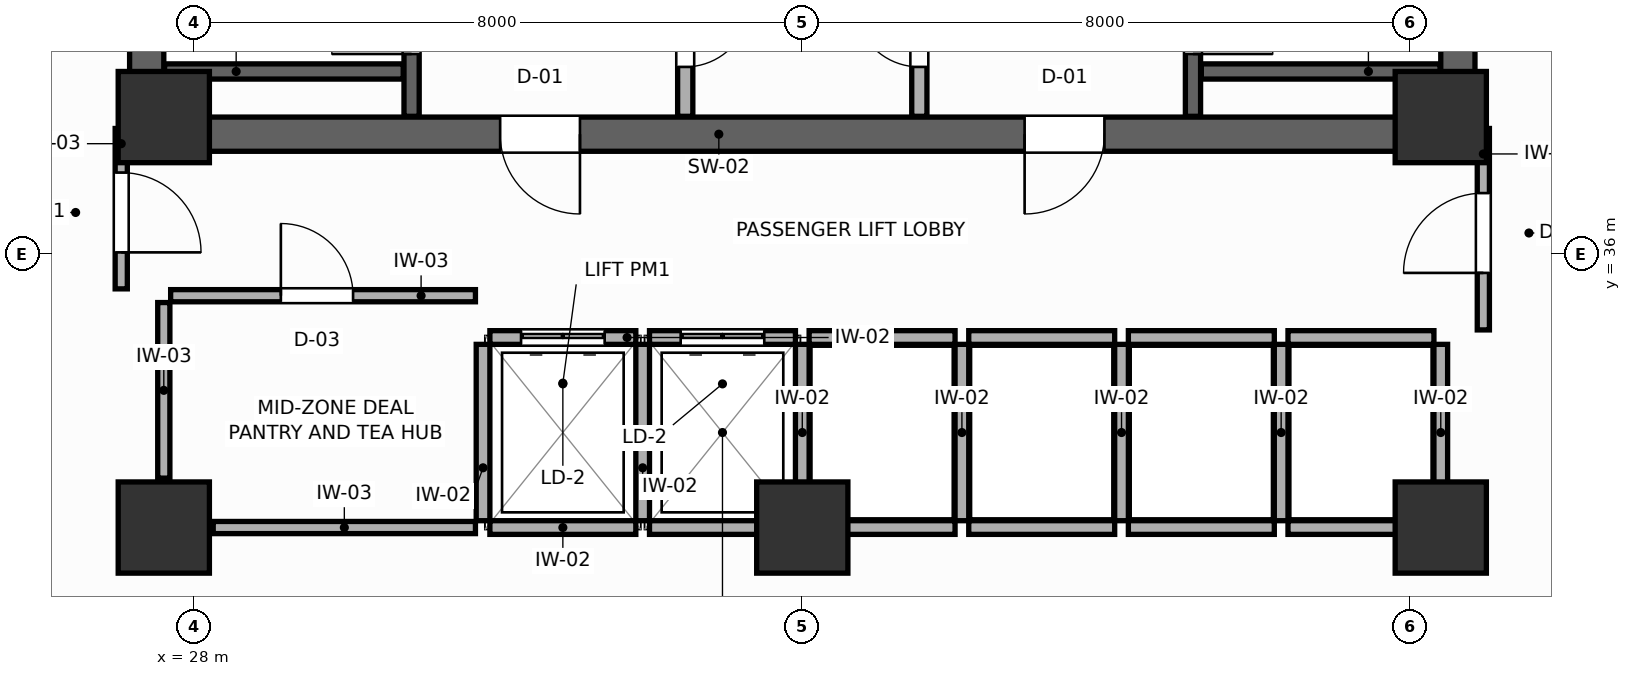
"""IFC4 building model, lengths in metres.
Left out: names, types, materials, properties, quantities, classifications, styles, units other than length and angle.
Written with IfcOpenShell. Run it as: python <this file> out.ifc"""

import sys

from ifc_helpers import new_model, si_unit, direction, frame, frame_2d, origin, origin_2d, place, context, subcontext, project, spatial, rectangle, extrude, source, transform, mapped, element, fill, save


model = new_model("IFC4")
c1 = context("Model", 3, precision=1e-05, world=origin(), true_north=direction((0.0, 1.0)))
c2 = subcontext(c1, "Body", "Model", "MODEL_VIEW")
j1 = project(units=[si_unit("LENGTHUNIT", "METRE"), si_unit("PLANEANGLEUNIT", "RADIAN")], contexts=[c1])
p1 = place(None, origin())
s1 = spatial("IfcSite", under=j1, at=p1, CompositionType="ELEMENT")
p2 = place(p1, origin())
s2 = spatial("IfcBuilding", under=s1, at=p2, CompositionType="ELEMENT")
p3 = place(p2, frame((0.0, 0.0, 154.2)))
s3 = spatial("IfcBuildingStorey", under=s2, at=p3, CompositionType="ELEMENT", Elevation=154.2)
p4 = place(p3, frame((27.15, 37.575, 0.0), z_axis=(0.0, 0.0, 1.0), x_axis=(1.0, 0.0, 0.0)))
e1 = element("IfcWall", 1, at=p4, inside=s3, PredefinedType="SHEAR", context=c2, shape_type="SweptSolid", body=[
    extrude(rectangle(XDim=17.7, YDim=0.45, at=frame_2d((8.85, 0.0))), origin(), (0.0, 0.0, 1.0), 3.6),
])
p5 = place(p4, frame((4.875, 0.0, 0.0)))
e2 = element("IfcOpeningElement", 2, at=p5, cuts=e1, PredefinedType="OPENING", context=c2, shape_type="SweptSolid", body=[
    extrude(rectangle(XDim=1.05, YDim=2.1, at=frame_2d((0.525, 1.05))), frame((0.0, 0.235, 0.0), z_axis=(0.0, -1.0, 0.0), x_axis=(1.0, 0.0, 0.0)), (0.0, 0.0, 1.0), 0.47),
])
p6 = place(p4, frame((11.775, 0.0, 0.0)))
e3 = element("IfcOpeningElement", 3, at=p6, cuts=e1, PredefinedType="OPENING", context=c2, shape_type="SweptSolid", body=[
    extrude(rectangle(XDim=1.05, YDim=2.1, at=frame_2d((0.525, 1.05))), frame((0.0, 0.235, 0.0), z_axis=(0.0, -1.0, 0.0), x_axis=(1.0, 0.0, 0.0)), (0.0, 0.0, 1.0), 0.47),
])
for number, where, z_axis, x_axis in (
    (4, (27.375, 37.8, 0.0), (0.0, 0.0, 1.0), (0.0, 1.0, 0.0)),
    (5, (44.625, 37.8, 0.0), (0.0, 0.0, 1.0), (0.0, 1.0, 0.0)),
):
    element("IfcWall", number, at=place(p3, frame(where, z_axis=z_axis, x_axis=x_axis)), inside=s3, PredefinedType="SHEAR", context=c2, shape_type="SweptSolid", body=[
        extrude(rectangle(XDim=9.0, YDim=0.45, at=frame_2d((4.5, 0.0))), origin(), (0.0, 0.0, 1.0), 3.6),
    ])
m1 = source(origin(), c2, "Body", "SweptSolid", [
    extrude(rectangle(XDim=1.2, YDim=1.2, at=origin_2d()), origin(), (0.0, 0.0, 1.0), 3.6),
])
for number, where, z_axis, x_axis in (
    (6, (27.6, 37.8, 0.0), (0.0, 0.0, 1.0), (1.0, 0.0, 0.0)),
    (7, (44.4, 37.8, 0.0), (0.0, 0.0, 1.0), (1.0, 0.0, 0.0)),
    (8, (27.6, 32.4, 0.0), (0.0, 0.0, 1.0), (1.0, 0.0, 0.0)),
    (9, (44.4, 32.4, 0.0), (0.0, 0.0, 1.0), (1.0, 0.0, 0.0)),
    (10, (36.0, 32.4, 0.0), (0.0, 0.0, 1.0), (1.0, 0.0, 0.0)),
):
    element("IfcColumn", number, at=place(p3, frame(where, z_axis=z_axis, x_axis=x_axis)), inside=s3, PredefinedType="COLUMN", context=c2, shape_type="MappedRepresentation", body=[
        mapped(m1, transform((0.0, 0.0, 0.0), scale=1.0)),
    ])
p7 = place(p3, frame((30.86, 37.81, 0.0), z_axis=(0.0, 0.0, 1.0), x_axis=(0.0, 1.0, 0.0)))
e11 = element("IfcWall", 11, at=p7, inside=s3, PredefinedType="SHEAR", context=c2, shape_type="SweptSolid", body=[
    extrude(rectangle(XDim=8.98, YDim=0.2, at=frame_2d((4.49, 0.0))), origin(), (0.0, 0.0, 1.0), 3.6),
])
p8 = place(p7, frame((0.82, 0.0, 0.0)))
e12 = element("IfcOpeningElement", 12, at=p8, cuts=e11, PredefinedType="OPENING", context=c2, shape_type="SweptSolid", body=[
    extrude(rectangle(XDim=1.05, YDim=2.1, at=frame_2d((0.525, 1.05))), frame((0.0, 0.11, 0.0), z_axis=(0.0, -1.0, 0.0), x_axis=(1.0, 0.0, 0.0)), (0.0, 0.0, 1.0), 0.22),
])
p9 = place(p3, frame((27.61, 38.4, 0.0), z_axis=(0.0, 0.0, 1.0), x_axis=(1.0, 0.0, 0.0)))
e13 = element("IfcWall", 13, at=p9, inside=s3, PredefinedType="SHEAR", context=c2, shape_type="SweptSolid", body=[
    extrude(rectangle(XDim=3.14, YDim=0.2, at=frame_2d((1.57, 0.0))), origin(), (0.0, 0.0, 1.0), 3.6),
])
p10 = place(p3, frame((41.14, 37.81, 0.0), z_axis=(0.0, 0.0, 1.0), x_axis=(0.0, 1.0, 0.0)))
e14 = element("IfcWall", 14, at=p10, inside=s3, PredefinedType="SHEAR", context=c2, shape_type="SweptSolid", body=[
    extrude(rectangle(XDim=8.98, YDim=0.2, at=frame_2d((4.49, 0.0))), origin(), (0.0, 0.0, 1.0), 3.6),
])
p11 = place(p10, frame((0.82, 0.0, 0.0)))
e15 = element("IfcOpeningElement", 15, at=p11, cuts=e14, PredefinedType="OPENING", context=c2, shape_type="SweptSolid", body=[
    extrude(rectangle(XDim=1.05, YDim=2.1, at=frame_2d((0.525, 1.05))), frame((0.0, 0.11, 0.0), z_axis=(0.0, -1.0, 0.0), x_axis=(1.0, 0.0, 0.0)), (0.0, 0.0, 1.0), 0.22),
])
p12 = place(p3, frame((41.25, 38.4, 0.0), z_axis=(0.0, 0.0, 1.0), x_axis=(1.0, 0.0, 0.0)))
e16 = element("IfcWall", 16, at=p12, inside=s3, PredefinedType="SHEAR", context=c2, shape_type="SweptSolid", body=[
    extrude(rectangle(XDim=3.14, YDim=0.2, at=frame_2d((1.57, 0.0))), origin(), (0.0, 0.0, 1.0), 3.6),
])
p13 = place(p3, frame((34.46, 37.81, 0.0), z_axis=(0.0, 0.0, 1.0), x_axis=(0.0, 1.0, 0.0)))
e17 = element("IfcWall", 17, at=p13, inside=s3, PredefinedType="PARTITIONING", context=c2, shape_type="SweptSolid", body=[
    extrude(rectangle(XDim=8.98, YDim=0.2, at=frame_2d((4.49, 0.0))), origin(), (0.0, 0.0, 1.0), 3.4),
])
p14 = place(p13, frame((0.65, 0.0, 0.0)))
e18 = element("IfcOpeningElement", 18, at=p14, cuts=e17, PredefinedType="OPENING", context=c2, shape_type="SweptSolid", body=[
    extrude(rectangle(XDim=0.85, YDim=2.05, at=frame_2d((0.425, 1.025))), frame((0.0, 0.11, 0.0), z_axis=(0.0, -1.0, 0.0), x_axis=(1.0, 0.0, 0.0)), (0.0, 0.0, 1.0), 0.22),
])
p15 = place(p3, frame((37.54, 37.81, 0.0), z_axis=(0.0, 0.0, 1.0), x_axis=(0.0, 1.0, 0.0)))
e19 = element("IfcWall", 19, at=p15, inside=s3, PredefinedType="PARTITIONING", context=c2, shape_type="SweptSolid", body=[
    extrude(rectangle(XDim=8.98, YDim=0.2, at=frame_2d((4.49, 0.0))), origin(), (0.0, 0.0, 1.0), 3.4),
])
p16 = place(p15, frame((0.65, 0.0, 0.0)))
e20 = element("IfcOpeningElement", 20, at=p16, cuts=e19, PredefinedType="OPENING", context=c2, shape_type="SweptSolid", body=[
    extrude(rectangle(XDim=0.85, YDim=2.05, at=frame_2d((0.425, 1.025))), frame((0.0, 0.11, 0.0), z_axis=(0.0, -1.0, 0.0), x_axis=(1.0, 0.0, 0.0)), (0.0, 0.0, 1.0), 0.22),
])
p17 = place(p3, frame((31.89, 34.9, 0.0), z_axis=(0.0, 0.0, 1.0), x_axis=(1.0, 0.0, 0.0)))
e21 = element("IfcWall", 21, at=p17, inside=s3, PredefinedType="PARTITIONING", context=c2, shape_type="SweptSolid", body=[
    extrude(rectangle(XDim=1.92, YDim=0.18, at=frame_2d((0.96, 0.0))), origin(), (0.0, 0.0, 1.0), 3.4),
])
p18 = place(p17, frame((0.41, 0.0, 0.0)))
e22 = element("IfcOpeningElement", 22, at=p18, cuts=e21, PredefinedType="OPENING", context=c2, shape_type="SweptSolid", body=[
    extrude(rectangle(XDim=1.1, YDim=2.1, at=frame_2d((0.55, 1.05))), frame((0.0, 0.1, 0.0), z_axis=(0.0, -1.0, 0.0), x_axis=(1.0, 0.0, 0.0)), (0.0, 0.0, 1.0), 0.2),
])
p19 = place(p3, frame((31.89, 32.4, 0.0), z_axis=(0.0, 0.0, 1.0), x_axis=(1.0, 0.0, 0.0)))
e23 = element("IfcWall", 23, at=p19, inside=s3, PredefinedType="PARTITIONING", context=c2, shape_type="SweptSolid", body=[
    extrude(rectangle(XDim=1.92, YDim=0.18, at=frame_2d((0.96, 0.0))), origin(), (0.0, 0.0, 1.0), 2.16),
])
p20 = place(p3, frame((31.8, 32.49, 0.0), z_axis=(0.0, 0.0, 1.0), x_axis=(0.0, 1.0, 0.0)))
e24 = element("IfcWall", 24, at=p20, inside=s3, PredefinedType="PARTITIONING", context=c2, shape_type="SweptSolid", body=[
    extrude(rectangle(XDim=2.32, YDim=0.18, at=frame_2d((1.16, 0.0))), origin(), (0.0, 0.0, 1.0), 3.4),
])
p21 = place(p3, frame((33.99, 34.9, 0.0), z_axis=(0.0, 0.0, 1.0), x_axis=(1.0, 0.0, 0.0)))
e25 = element("IfcWall", 25, at=p21, inside=s3, PredefinedType="PARTITIONING", context=c2, shape_type="SweptSolid", body=[
    extrude(rectangle(XDim=1.92, YDim=0.18, at=frame_2d((0.96, 0.0))), origin(), (0.0, 0.0, 1.0), 3.4),
])
p22 = place(p21, frame((0.41, 0.0, 0.0)))
e26 = element("IfcOpeningElement", 26, at=p22, cuts=e25, PredefinedType="OPENING", context=c2, shape_type="SweptSolid", body=[
    extrude(rectangle(XDim=1.1, YDim=2.1, at=frame_2d((0.55, 1.05))), frame((0.0, 0.1, 0.0), z_axis=(0.0, -1.0, 0.0), x_axis=(1.0, 0.0, 0.0)), (0.0, 0.0, 1.0), 0.2),
])
p23 = place(p3, frame((33.99, 32.4, 0.0), z_axis=(0.0, 0.0, 1.0), x_axis=(1.0, 0.0, 0.0)))
e27 = element("IfcWall", 27, at=p23, inside=s3, PredefinedType="PARTITIONING", context=c2, shape_type="SweptSolid", body=[
    extrude(rectangle(XDim=1.92, YDim=0.18, at=frame_2d((0.96, 0.0))), origin(), (0.0, 0.0, 1.0), 2.16),
])
p24 = place(p3, frame((33.9, 32.49, 0.0), z_axis=(0.0, 0.0, 1.0), x_axis=(0.0, 1.0, 0.0)))
e28 = element("IfcWall", 28, at=p24, inside=s3, PredefinedType="PARTITIONING", context=c2, shape_type="SweptSolid", body=[
    extrude(rectangle(XDim=2.32, YDim=0.18, at=frame_2d((1.16, 0.0))), origin(), (0.0, 0.0, 1.0), 3.4),
])
p25 = place(p3, frame((36.09, 34.9, 0.0), z_axis=(0.0, 0.0, 1.0), x_axis=(1.0, 0.0, 0.0)))
e29 = element("IfcWall", 29, at=p25, inside=s3, PredefinedType="PARTITIONING", context=c2, shape_type="SweptSolid", body=[
    extrude(rectangle(XDim=1.92, YDim=0.18, at=frame_2d((0.96, 0.0))), origin(), (0.0, 0.0, 1.0), 3.4),
])
p26 = place(p3, frame((36.09, 32.4, 0.0), z_axis=(0.0, 0.0, 1.0), x_axis=(1.0, 0.0, 0.0)))
e30 = element("IfcWall", 30, at=p26, inside=s3, PredefinedType="PARTITIONING", context=c2, shape_type="SweptSolid", body=[
    extrude(rectangle(XDim=1.92, YDim=0.18, at=frame_2d((0.96, 0.0))), origin(), (0.0, 0.0, 1.0), 2.16),
])
p27 = place(p3, frame((36.0, 32.49, 0.0), z_axis=(0.0, 0.0, 1.0), x_axis=(0.0, 1.0, 0.0)))
e31 = element("IfcWall", 31, at=p27, inside=s3, PredefinedType="PARTITIONING", context=c2, shape_type="SweptSolid", body=[
    extrude(rectangle(XDim=2.32, YDim=0.18, at=frame_2d((1.16, 0.0))), origin(), (0.0, 0.0, 1.0), 3.4),
])
p28 = place(p3, frame((38.19, 34.9, 0.0), z_axis=(0.0, 0.0, 1.0), x_axis=(1.0, 0.0, 0.0)))
e32 = element("IfcWall", 32, at=p28, inside=s3, PredefinedType="PARTITIONING", context=c2, shape_type="SweptSolid", body=[
    extrude(rectangle(XDim=1.92, YDim=0.18, at=frame_2d((0.96, 0.0))), origin(), (0.0, 0.0, 1.0), 3.4),
])
p29 = place(p3, frame((38.19, 32.4, 0.0), z_axis=(0.0, 0.0, 1.0), x_axis=(1.0, 0.0, 0.0)))
e33 = element("IfcWall", 33, at=p29, inside=s3, PredefinedType="PARTITIONING", context=c2, shape_type="SweptSolid", body=[
    extrude(rectangle(XDim=1.92, YDim=0.18, at=frame_2d((0.96, 0.0))), origin(), (0.0, 0.0, 1.0), 2.16),
])
p30 = place(p3, frame((38.1, 32.49, 0.0), z_axis=(0.0, 0.0, 1.0), x_axis=(0.0, 1.0, 0.0)))
e34 = element("IfcWall", 34, at=p30, inside=s3, PredefinedType="PARTITIONING", context=c2, shape_type="SweptSolid", body=[
    extrude(rectangle(XDim=2.32, YDim=0.18, at=frame_2d((1.16, 0.0))), origin(), (0.0, 0.0, 1.0), 3.4),
])
p31 = place(p3, frame((40.29, 34.9, 0.0), z_axis=(0.0, 0.0, 1.0), x_axis=(1.0, 0.0, 0.0)))
e35 = element("IfcWall", 35, at=p31, inside=s3, PredefinedType="PARTITIONING", context=c2, shape_type="SweptSolid", body=[
    extrude(rectangle(XDim=1.92, YDim=0.18, at=frame_2d((0.96, 0.0))), origin(), (0.0, 0.0, 1.0), 3.4),
])
p32 = place(p3, frame((40.29, 32.4, 0.0), z_axis=(0.0, 0.0, 1.0), x_axis=(1.0, 0.0, 0.0)))
e36 = element("IfcWall", 36, at=p32, inside=s3, PredefinedType="PARTITIONING", context=c2, shape_type="SweptSolid", body=[
    extrude(rectangle(XDim=1.92, YDim=0.18, at=frame_2d((0.96, 0.0))), origin(), (0.0, 0.0, 1.0), 2.16),
])
p33 = place(p3, frame((40.2, 32.49, 0.0), z_axis=(0.0, 0.0, 1.0), x_axis=(0.0, 1.0, 0.0)))
e37 = element("IfcWall", 37, at=p33, inside=s3, PredefinedType="PARTITIONING", context=c2, shape_type="SweptSolid", body=[
    extrude(rectangle(XDim=2.32, YDim=0.18, at=frame_2d((1.16, 0.0))), origin(), (0.0, 0.0, 1.0), 3.4),
])
p34 = place(p3, frame((42.39, 34.9, 0.0), z_axis=(0.0, 0.0, 1.0), x_axis=(1.0, 0.0, 0.0)))
e38 = element("IfcWall", 38, at=p34, inside=s3, PredefinedType="PARTITIONING", context=c2, shape_type="SweptSolid", body=[
    extrude(rectangle(XDim=1.92, YDim=0.18, at=frame_2d((0.96, 0.0))), origin(), (0.0, 0.0, 1.0), 3.4),
])
p35 = place(p3, frame((42.39, 32.4, 0.0), z_axis=(0.0, 0.0, 1.0), x_axis=(1.0, 0.0, 0.0)))
e39 = element("IfcWall", 39, at=p35, inside=s3, PredefinedType="PARTITIONING", context=c2, shape_type="SweptSolid", body=[
    extrude(rectangle(XDim=1.92, YDim=0.18, at=frame_2d((0.96, 0.0))), origin(), (0.0, 0.0, 1.0), 2.16),
])
for number, where, z_axis, x_axis in (
    (40, (42.3, 32.49, 0.0), (0.0, 0.0, 1.0), (0.0, 1.0, 0.0)),
    (41, (44.4, 32.49, 0.0), (0.0, 0.0, 1.0), (0.0, 1.0, 0.0)),
):
    element("IfcWall", number, at=place(p3, frame(where, z_axis=z_axis, x_axis=x_axis)), inside=s3, PredefinedType="PARTITIONING", context=c2, shape_type="SweptSolid", body=[
        extrude(rectangle(XDim=2.32, YDim=0.18, at=frame_2d((1.16, 0.0))), origin(), (0.0, 0.0, 1.0), 3.4),
    ])
p36 = place(p3, frame((28.25, 32.4, 0.0), z_axis=(0.0, 0.0, 1.0), x_axis=(1.0, 0.0, 0.0)))
e42 = element("IfcWall", 42, at=p36, inside=s3, PredefinedType="PARTITIONING", context=c2, shape_type="SweptSolid", body=[
    extrude(rectangle(XDim=3.45, YDim=0.16, at=frame_2d((1.725, 0.0))), origin(), (0.0, 0.0, 1.0), 2.16),
])
p37 = place(p3, frame((27.6, 33.05, 0.0), z_axis=(0.0, 0.0, 1.0), x_axis=(0.0, 1.0, 0.0)))
e43 = element("IfcWall", 43, at=p37, inside=s3, PredefinedType="PARTITIONING", context=c2, shape_type="SweptSolid", body=[
    extrude(rectangle(XDim=2.31, YDim=0.16, at=frame_2d((1.155, 0.0))), origin(), (0.0, 0.0, 1.0), 3.4),
])
p38 = place(p3, frame((27.69, 35.45, 0.0), z_axis=(0.0, 0.0, 1.0), x_axis=(1.0, 0.0, 0.0)))
e44 = element("IfcWall", 44, at=p38, inside=s3, PredefinedType="PARTITIONING", context=c2, shape_type="SweptSolid", body=[
    extrude(rectangle(XDim=4.01, YDim=0.16, at=frame_2d((2.005, 0.0))), origin(), (0.0, 0.0, 1.0), 3.4),
])
p39 = place(p38, frame((1.45, 0.0, 0.0)))
e45 = element("IfcOpeningElement", 45, at=p39, cuts=e44, PredefinedType="OPENING", context=c2, shape_type="SweptSolid", body=[
    extrude(rectangle(XDim=0.95, YDim=2.05, at=frame_2d((0.475, 1.025))), frame((0.0, 0.09, 0.0), z_axis=(0.0, -1.0, 0.0), x_axis=(1.0, 0.0, 0.0)), (0.0, 0.0, 1.0), 0.18),
])
p40 = place(p3, frame((27.04, 35.54, 0.0), z_axis=(0.0, 0.0, 1.0), x_axis=(0.0, 1.0, 0.0)))
e46 = element("IfcWall", 46, at=p40, inside=s3, PredefinedType="PARTITIONING", context=c2, shape_type="SweptSolid", body=[
    extrude(rectangle(XDim=2.11, YDim=0.16, at=frame_2d((1.055, 0.0))), origin(), (0.0, 0.0, 1.0), 3.4),
])
p41 = place(p40, frame((0.48, 0.0, 0.0)))
e47 = element("IfcOpeningElement", 47, at=p41, cuts=e46, PredefinedType="OPENING", context=c2, shape_type="SweptSolid", body=[
    extrude(rectangle(XDim=1.05, YDim=2.1, at=frame_2d((0.525, 1.05))), frame((0.0, 0.09, 0.0), z_axis=(0.0, -1.0, 0.0), x_axis=(1.0, 0.0, 0.0)), (0.0, 0.0, 1.0), 0.18),
])
p42 = place(p3, frame((44.96, 35.0, 0.0), z_axis=(0.0, 0.0, 1.0), x_axis=(0.0, 1.0, 0.0)))
e48 = element("IfcWall", 48, at=p42, inside=s3, PredefinedType="PARTITIONING", context=c2, shape_type="SweptSolid", body=[
    extrude(rectangle(XDim=2.65, YDim=0.16, at=frame_2d((1.325, 0.0))), origin(), (0.0, 0.0, 1.0), 3.4),
])
p43 = place(p42, frame((0.75, 0.0, 0.0)))
e49 = element("IfcOpeningElement", 49, at=p43, cuts=e48, PredefinedType="OPENING", context=c2, shape_type="SweptSolid", body=[
    extrude(rectangle(XDim=1.05, YDim=2.1, at=frame_2d((0.525, 1.05))), frame((0.0, 0.09, 0.0), z_axis=(0.0, -1.0, 0.0), x_axis=(1.0, 0.0, 0.0)), (0.0, 0.0, 1.0), 0.18),
])
p44 = place(p8, origin())
e50 = element("IfcDoor", 50, at=p44, inside=s3, OperationType="SINGLE_SWING_LEFT", PredefinedType="DOOR", context=c2, shape_type="SweptSolid", body=[
    extrude(rectangle(XDim=1.05, YDim=2.1, at=frame_2d((0.525, 1.05))), frame((0.0, 0.025, 0.0), z_axis=(0.0, -1.0, 0.0), x_axis=(1.0, 0.0, 0.0)), (0.0, 0.0, 1.0), 0.05),
])
fill(e12, e50)
p45 = place(p11, frame((1.05, 0.0, 0.0), z_axis=(0.0, 0.0, 1.0), x_axis=(-1.0, 0.0, 0.0)))
e51 = element("IfcDoor", 51, at=p45, inside=s3, OperationType="SINGLE_SWING_RIGHT", PredefinedType="DOOR", context=c2, shape_type="SweptSolid", body=[
    extrude(rectangle(XDim=1.05, YDim=2.1, at=frame_2d((0.525, 1.05))), frame((0.0, 0.025, 0.0), z_axis=(0.0, -1.0, 0.0), x_axis=(1.0, 0.0, 0.0)), (0.0, 0.0, 1.0), 0.05),
])
fill(e15, e51)
p46 = place(p14, frame((0.85, 0.0, 0.0), z_axis=(0.0, 0.0, 1.0), x_axis=(-1.0, 0.0, 0.0)))
e52 = element("IfcDoor", 52, at=p46, inside=s3, OperationType="SINGLE_SWING_LEFT", PredefinedType="DOOR", context=c2, shape_type="SweptSolid", body=[
    extrude(rectangle(XDim=0.85, YDim=2.05, at=frame_2d((0.425, 1.025))), frame((0.0, 0.025, 0.0), z_axis=(0.0, -1.0, 0.0), x_axis=(1.0, 0.0, 0.0)), (0.0, 0.0, 1.0), 0.05),
])
fill(e18, e52)
p47 = place(p16, origin())
e53 = element("IfcDoor", 53, at=p47, inside=s3, OperationType="SINGLE_SWING_RIGHT", PredefinedType="DOOR", context=c2, shape_type="SweptSolid", body=[
    extrude(rectangle(XDim=0.85, YDim=2.05, at=frame_2d((0.425, 1.025))), frame((0.0, 0.025, 0.0), z_axis=(0.0, -1.0, 0.0), x_axis=(1.0, 0.0, 0.0)), (0.0, 0.0, 1.0), 0.05),
])
fill(e20, e53)
p48 = place(p18, origin())
e54 = element("IfcDoor", 54, at=p48, inside=s3, OperationType="DOUBLE_DOOR_SLIDING", PredefinedType="DOOR", context=c2, shape_type="SweptSolid", body=[
    extrude(rectangle(XDim=1.1, YDim=2.1, at=frame_2d((0.55, 1.05))), frame((0.0, 0.025, 0.0), z_axis=(0.0, -1.0, 0.0), x_axis=(1.0, 0.0, 0.0)), (0.0, 0.0, 1.0), 0.05),
])
fill(e22, e54)
p49 = place(p22, origin())
e55 = element("IfcDoor", 55, at=p49, inside=s3, OperationType="DOUBLE_DOOR_SLIDING", PredefinedType="DOOR", context=c2, shape_type="SweptSolid", body=[
    extrude(rectangle(XDim=1.1, YDim=2.1, at=frame_2d((0.55, 1.05))), frame((0.0, 0.025, 0.0), z_axis=(0.0, -1.0, 0.0), x_axis=(1.0, 0.0, 0.0)), (0.0, 0.0, 1.0), 0.05),
])
fill(e26, e55)
p50 = place(p39, origin())
e56 = element("IfcDoor", 56, at=p50, inside=s3, OperationType="SINGLE_SWING_LEFT", PredefinedType="DOOR", context=c2, shape_type="SweptSolid", body=[
    extrude(rectangle(XDim=0.95, YDim=2.05, at=frame_2d((0.475, 1.025))), frame((0.0, 0.025, 0.0), z_axis=(0.0, -1.0, 0.0), x_axis=(1.0, 0.0, 0.0)), (0.0, 0.0, 1.0), 0.05),
])
fill(e45, e56)
p51 = place(p41, frame((1.05, 0.0, 0.0), z_axis=(0.0, 0.0, 1.0), x_axis=(-1.0, 0.0, 0.0)))
e57 = element("IfcDoor", 57, at=p51, inside=s3, OperationType="SINGLE_SWING_RIGHT", PredefinedType="DOOR", context=c2, shape_type="SweptSolid", body=[
    extrude(rectangle(XDim=1.05, YDim=2.1, at=frame_2d((0.525, 1.05))), frame((0.0, 0.025, 0.0), z_axis=(0.0, -1.0, 0.0), x_axis=(1.0, 0.0, 0.0)), (0.0, 0.0, 1.0), 0.05),
])
fill(e47, e57)
p52 = place(p43, origin())
e58 = element("IfcDoor", 58, at=p52, inside=s3, OperationType="SINGLE_SWING_LEFT", PredefinedType="DOOR", context=c2, shape_type="SweptSolid", body=[
    extrude(rectangle(XDim=1.05, YDim=2.1, at=frame_2d((0.525, 1.05))), frame((0.0, 0.025, 0.0), z_axis=(0.0, -1.0, 0.0), x_axis=(1.0, 0.0, 0.0)), (0.0, 0.0, 1.0), 0.05),
])
fill(e49, e58)
p53 = place(p5, frame((1.05, 0.0, 0.0), z_axis=(0.0, 0.0, 1.0), x_axis=(-1.0, 0.0, 0.0)))
e59 = element("IfcDoor", 59, at=p53, inside=s3, OperationType="SINGLE_SWING_LEFT", PredefinedType="DOOR", context=c2, shape_type="SweptSolid", body=[
    extrude(rectangle(XDim=1.05, YDim=2.1, at=frame_2d((0.525, 1.05))), frame((0.0, 0.025, 0.0), z_axis=(0.0, -1.0, 0.0), x_axis=(1.0, 0.0, 0.0)), (0.0, 0.0, 1.0), 0.05),
])
fill(e2, e59)
p54 = place(p6, frame((1.05, 0.0, 0.0), z_axis=(0.0, 0.0, 1.0), x_axis=(-1.0, 0.0, 0.0)))
e60 = element("IfcDoor", 60, at=p54, inside=s3, OperationType="SINGLE_SWING_RIGHT", PredefinedType="DOOR", context=c2, shape_type="SweptSolid", body=[
    extrude(rectangle(XDim=1.05, YDim=2.1, at=frame_2d((0.525, 1.05))), frame((0.0, 0.025, 0.0), z_axis=(0.0, -1.0, 0.0), x_axis=(1.0, 0.0, 0.0)), (0.0, 0.0, 1.0), 0.05),
])
fill(e3, e60)
save(model, sys.argv[1])
